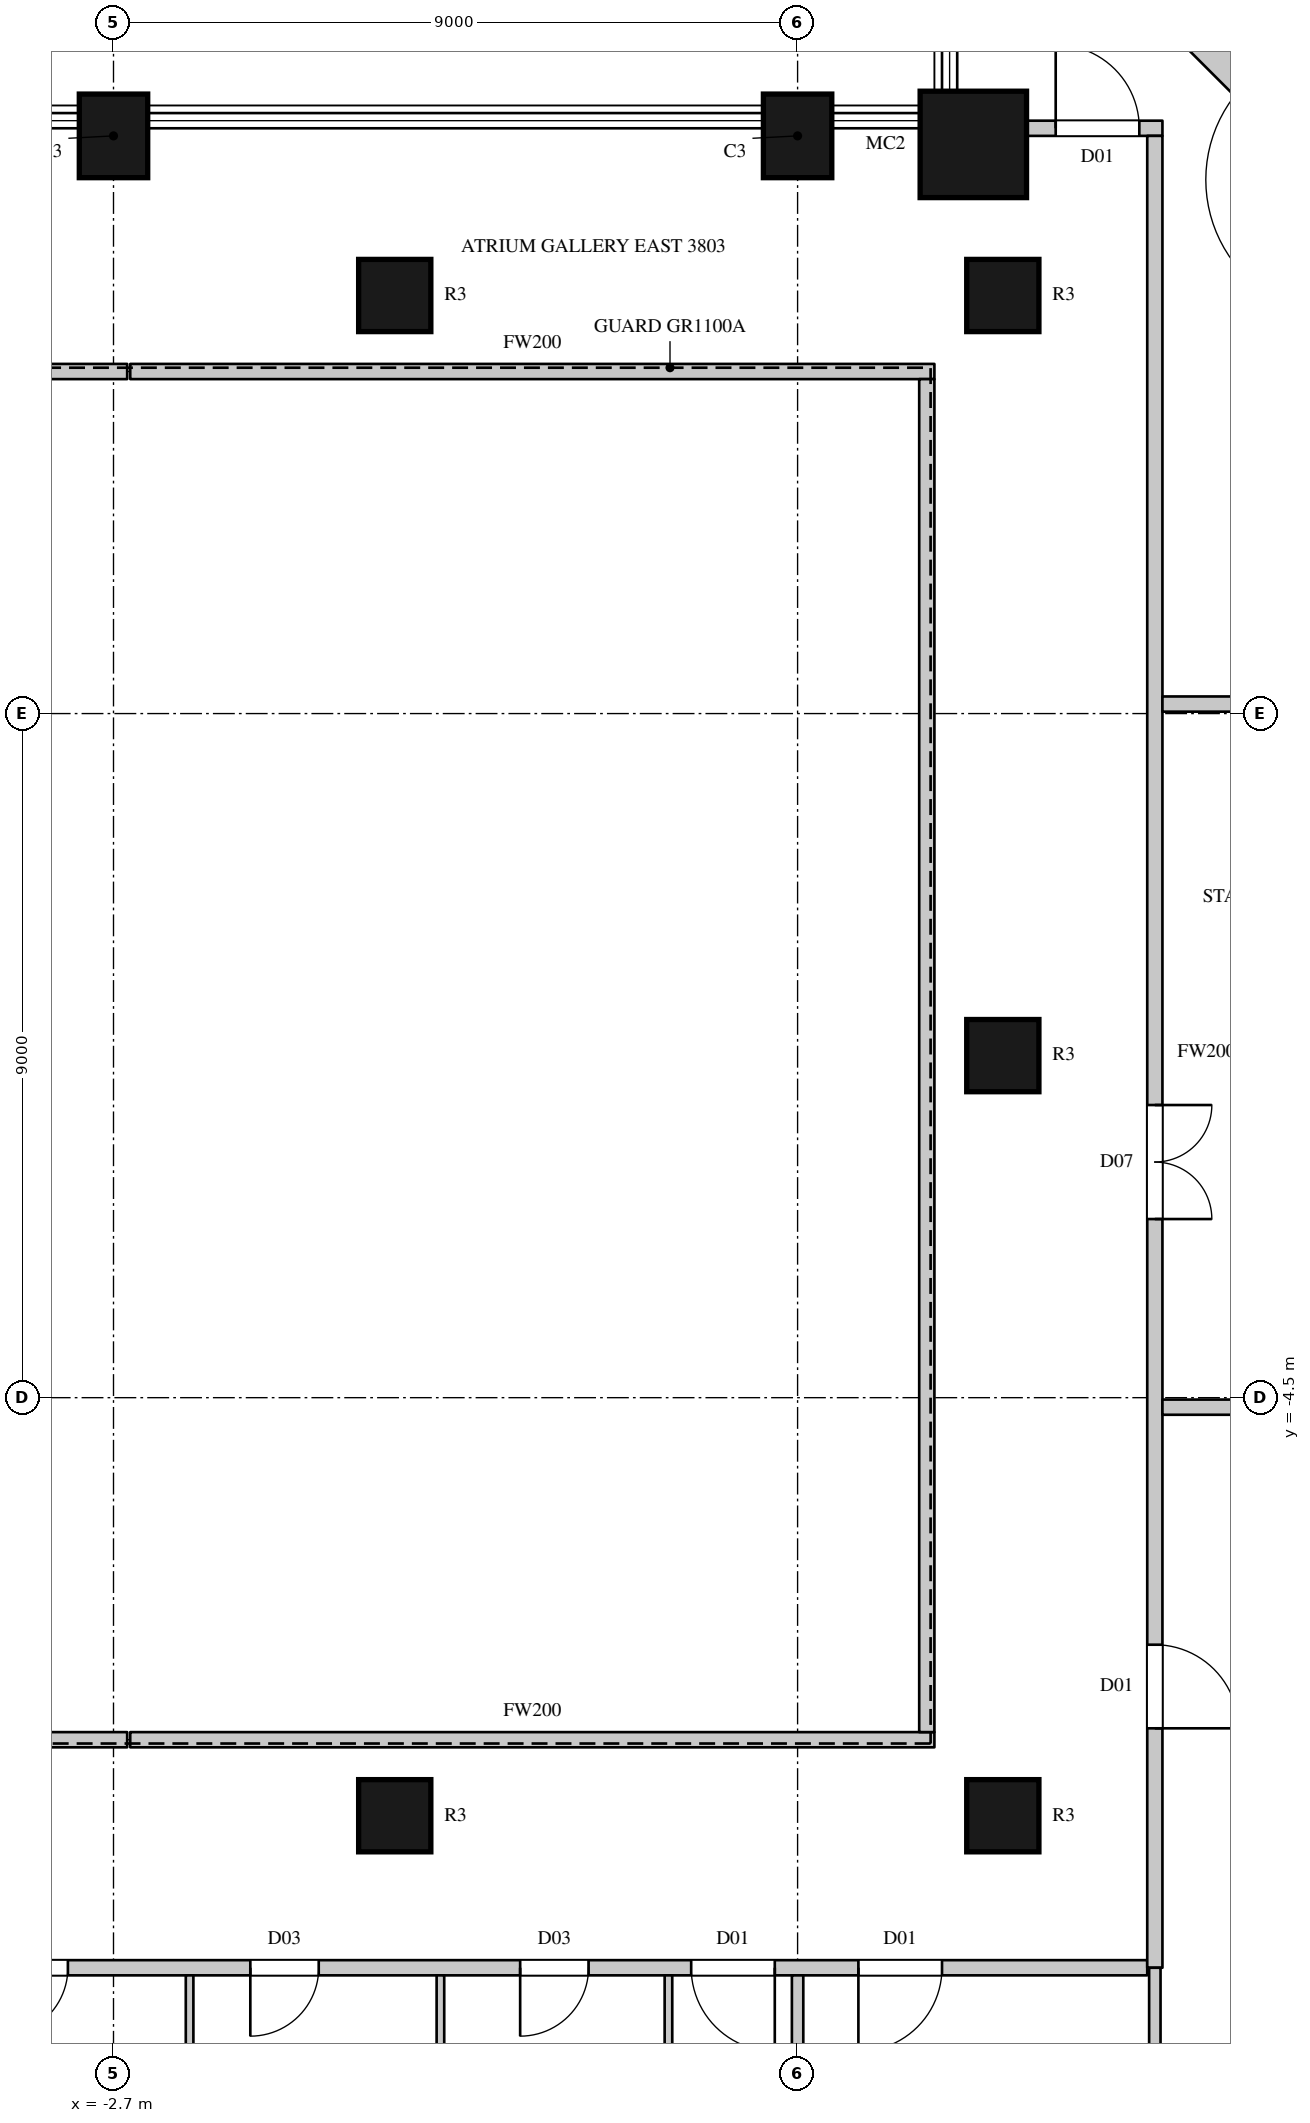
"""IFC4 building model, lengths in metres.
Left out: names, types, materials, properties, quantities, classifications, styles, units other than length and angle.
Written with IfcOpenShell. Run it as: python <this file> out.ifc"""

import sys

from ifc_helpers import new_model, si_unit, direction, frame, frame_2d, origin, origin_2d, place, context, subcontext, project, spatial, rectangle, circle, extrude, element, fill, save


model = new_model("IFC4")
c1 = context("Model", 3, precision=1e-05, world=origin(), true_north=direction((0.0, 1.0)))
c2 = subcontext(c1, "Body", "Model", "MODEL_VIEW")
j1 = project(units=[si_unit("LENGTHUNIT", "METRE"), si_unit("PLANEANGLEUNIT", "RADIAN")], contexts=[c1])
p1 = place(None, origin())
s1 = spatial("IfcSite", under=j1, at=p1, CompositionType="ELEMENT")
p2 = place(p1, origin())
s2 = spatial("IfcBuilding", under=s1, at=p2, CompositionType="ELEMENT")
p3 = place(p2, frame((0.0, 0.0, 176.9)))
s3 = spatial("IfcBuildingStorey", under=s2, at=p3, CompositionType="ELEMENT", Elevation=176.9)
p4 = place(p3, frame((8.612, 11.988, 0.0), z_axis=(0.0, 0.0, 1.0), x_axis=(1.0, 0.0, 0.0)))
e1 = element("IfcColumn", 1, at=p4, inside=s3, PredefinedType="COLUMN", context=c2, shape_type="SweptSolid", body=[
    extrude(circle(Radius=0.7, at=origin_2d()), origin(), (0.0, 0.0, 1.0), 4.1),
])
for number, where, z_axis, x_axis in (
    (2, (6.3, 12.1, 0.0), (0.0, 0.0, 1.0), (-1.0, 0.0, 0.0)),
    (3, (-2.7, 12.1, 0.0), (0.0, 0.0, 1.0), (-1.0, 0.0, 0.0)),
):
    element("IfcColumn", number, at=place(p3, frame(where, z_axis=z_axis, x_axis=x_axis)), inside=s3, PredefinedType="COLUMN", context=c2, shape_type="SweptSolid", body=[
        extrude(rectangle(XDim=0.9, YDim=1.1, at=origin_2d()), origin(), (0.0, 0.0, 1.0), 4.1),
    ])
for number, where, z_axis, x_axis in (
    (4, (1.0, -10.0, 0.0), (0.0, 0.0, 1.0), (1.0, 0.0, 0.0)),
    (5, (1.0, 10.0, 0.0), (0.0, 0.0, 1.0), (1.0, 0.0, 0.0)),
    (6, (9.0, -10.0, 0.0), (0.0, 0.0, 1.0), (1.0, 0.0, 0.0)),
    (7, (9.0, 0.0, 0.0), (0.0, 0.0, 1.0), (1.0, 0.0, 0.0)),
    (8, (9.0, 10.0, 0.0), (0.0, 0.0, 1.0), (1.0, 0.0, 0.0)),
):
    element("IfcColumn", number, at=place(p3, frame(where, z_axis=z_axis, x_axis=x_axis)), inside=s3, PredefinedType="COLUMN", context=c2, shape_type="SweptSolid", body=[
        extrude(circle(Radius=0.475, at=origin_2d()), origin(), (0.0, 0.0, 1.0), 4.1),
    ])
p5 = place(p3, frame((13.941, 11.053, 0.0), z_axis=(0.0, 0.0, 1.0), x_axis=(-0.707106781187, 0.707106781187, 0.0)))
e9 = element("IfcWall", 9, at=p5, inside=s3, PredefinedType="SOLIDWALL", context=c2, shape_type="SweptSolid", body=[
    extrude(rectangle(XDim=6.505, YDim=0.45, at=frame_2d((3.252, 0.0))), origin(), (0.0, 0.0, 1.0), 3.8),
])
p6 = place(p5, frame((0.665, 0.0, 0.0)))
e10 = element("IfcOpeningElement", 10, at=p6, cuts=e9, PredefinedType="OPENING", context=c2, shape_type="SweptSolid", body=[
    extrude(rectangle(XDim=1.8, YDim=2.4, at=frame_2d((0.9, 1.2))), frame((0.0, 0.235, 0.0), z_axis=(0.0, -1.0, 0.0), x_axis=(1.0, 0.0, 0.0)), (0.0, 0.0, 1.0), 0.47),
])
p7 = place(p3, frame((-10.9, -12.0, 0.0), z_axis=(0.0, 0.0, 1.0), x_axis=(1.0, 0.0, 0.0)))
e11 = element("IfcWall", 11, at=p7, inside=s3, PredefinedType="PARTITIONING", context=c2, shape_type="SweptSolid", body=[
    extrude(rectangle(XDim=21.8, YDim=0.2, at=frame_2d((10.9, 0.0))), origin(), (0.0, 0.0, 1.0), 3.8),
])
p8 = place(p7, frame((0.95, 0.0, 0.0)))
e12 = element("IfcOpeningElement", 12, at=p8, cuts=e11, PredefinedType="OPENING", context=c2, shape_type="SweptSolid", body=[
    extrude(rectangle(XDim=0.9, YDim=2.2, at=frame_2d((0.45, 1.1))), frame((0.0, 0.11, 0.0), z_axis=(0.0, -1.0, 0.0), x_axis=(1.0, 0.0, 0.0)), (0.0, 0.0, 1.0), 0.22),
])
p9 = place(p7, frame((3.95, 0.0, 0.0)))
e13 = element("IfcOpeningElement", 13, at=p9, cuts=e11, PredefinedType="OPENING", context=c2, shape_type="SweptSolid", body=[
    extrude(rectangle(XDim=0.9, YDim=2.2, at=frame_2d((0.45, 1.1))), frame((0.0, 0.11, 0.0), z_axis=(0.0, -1.0, 0.0), x_axis=(1.0, 0.0, 0.0)), (0.0, 0.0, 1.0), 0.22),
])
p10 = place(p7, frame((6.7, 0.0, 0.0)))
e14 = element("IfcOpeningElement", 14, at=p10, cuts=e11, PredefinedType="OPENING", context=c2, shape_type="SweptSolid", body=[
    extrude(rectangle(XDim=0.9, YDim=2.2, at=frame_2d((0.45, 1.1))), frame((0.0, 0.11, 0.0), z_axis=(0.0, -1.0, 0.0), x_axis=(1.0, 0.0, 0.0)), (0.0, 0.0, 1.0), 0.22),
])
p11 = place(p7, frame((10.0, 0.0, 0.0)))
e15 = element("IfcOpeningElement", 15, at=p11, cuts=e11, PredefinedType="OPENING", context=c2, shape_type="SweptSolid", body=[
    extrude(rectangle(XDim=0.9, YDim=2.2, at=frame_2d((0.45, 1.1))), frame((0.0, 0.11, 0.0), z_axis=(0.0, -1.0, 0.0), x_axis=(1.0, 0.0, 0.0)), (0.0, 0.0, 1.0), 0.22),
])
p12 = place(p7, frame((13.55, 0.0, 0.0)))
e16 = element("IfcOpeningElement", 16, at=p12, cuts=e11, PredefinedType="OPENING", context=c2, shape_type="SweptSolid", body=[
    extrude(rectangle(XDim=0.9, YDim=2.2, at=frame_2d((0.45, 1.1))), frame((0.0, 0.11, 0.0), z_axis=(0.0, -1.0, 0.0), x_axis=(1.0, 0.0, 0.0)), (0.0, 0.0, 1.0), 0.22),
])
p13 = place(p7, frame((15.8, 0.0, 0.0)))
e17 = element("IfcOpeningElement", 17, at=p13, cuts=e11, PredefinedType="OPENING", context=c2, shape_type="SweptSolid", body=[
    extrude(rectangle(XDim=1.1, YDim=2.4, at=frame_2d((0.55, 1.2))), frame((0.0, 0.11, 0.0), z_axis=(0.0, -1.0, 0.0), x_axis=(1.0, 0.0, 0.0)), (0.0, 0.0, 1.0), 0.22),
])
p14 = place(p7, frame((18.0, 0.0, 0.0)))
e18 = element("IfcOpeningElement", 18, at=p14, cuts=e11, PredefinedType="OPENING", context=c2, shape_type="SweptSolid", body=[
    extrude(rectangle(XDim=1.1, YDim=2.4, at=frame_2d((0.55, 1.2))), frame((0.0, 0.11, 0.0), z_axis=(0.0, -1.0, 0.0), x_axis=(1.0, 0.0, 0.0)), (0.0, 0.0, 1.0), 0.22),
])
for number, where, z_axis, x_axis in (
    (19, (-6.1, -9.0, 0.0), (0.0, 0.0, 1.0), (1.0, 0.0, 0.0)),
    (20, (-6.1, 9.0, 0.0), (0.0, 0.0, 1.0), (1.0, 0.0, 0.0)),
):
    element("IfcWall", number, at=place(p3, frame(where, z_axis=z_axis, x_axis=x_axis)), inside=s3, PredefinedType="PARTITIONING", context=c2, shape_type="SweptSolid", body=[
        extrude(rectangle(XDim=3.58, YDim=0.2, at=frame_2d((1.79, 0.0))), origin(), (0.0, 0.0, 1.0), 3.8),
    ])
for number, where, z_axis, x_axis in (
    (21, (-2.48, -9.0, 0.0), (0.0, 0.0, 1.0), (1.0, 0.0, 0.0)),
    (22, (-2.48, 9.0, 0.0), (0.0, 0.0, 1.0), (1.0, 0.0, 0.0)),
):
    element("IfcWall", number, at=place(p3, frame(where, z_axis=z_axis, x_axis=x_axis)), inside=s3, PredefinedType="PARTITIONING", context=c2, shape_type="SweptSolid", body=[
        extrude(rectangle(XDim=10.58, YDim=0.2, at=frame_2d((5.29, 0.0))), origin(), (0.0, 0.0, 1.0), 3.8),
    ])
p15 = place(p3, frame((8.0, -8.9, 0.0), z_axis=(0.0, 0.0, 1.0), x_axis=(0.0, 1.0, 0.0)))
e23 = element("IfcWall", 23, at=p15, inside=s3, PredefinedType="PARTITIONING", context=c2, shape_type="SweptSolid", body=[
    extrude(rectangle(XDim=17.8, YDim=0.2, at=frame_2d((8.9, 0.0))), origin(), (0.0, 0.0, 1.0), 3.8),
])
p16 = place(p3, frame((9.296, 12.2, 0.0), z_axis=(0.0, 0.0, 1.0), x_axis=(1.0, 0.0, 0.0)))
e24 = element("IfcWall", 24, at=p16, inside=s3, PredefinedType="PARTITIONING", context=c2, shape_type="SweptSolid", body=[
    extrude(rectangle(XDim=1.804, YDim=0.2, at=frame_2d((0.902, 0.0))), origin(), (0.0, 0.0, 1.0), 3.8),
])
p17 = place(p16, frame((0.4, 0.0, 0.0)))
e25 = element("IfcOpeningElement", 25, at=p17, cuts=e24, PredefinedType="OPENING", context=c2, shape_type="SweptSolid", body=[
    extrude(rectangle(XDim=1.1, YDim=2.4, at=frame_2d((0.55, 1.2))), frame((0.0, 0.11, 0.0), z_axis=(0.0, -1.0, 0.0), x_axis=(1.0, 0.0, 0.0)), (0.0, 0.0, 1.0), 0.22),
])
p18 = place(p3, frame((11.0, -12.0, 0.0), z_axis=(0.0, 0.0, 1.0), x_axis=(0.0, 1.0, 0.0)))
e26 = element("IfcWall", 26, at=p18, inside=s3, PredefinedType="PARTITIONING", context=c2, shape_type="SweptSolid", body=[
    extrude(rectangle(XDim=24.1, YDim=0.2, at=frame_2d((12.05, 0.0))), origin(), (0.0, 0.0, 1.0), 3.8),
])
p19 = place(p18, frame((9.85, 0.0, 0.0)))
e27 = element("IfcOpeningElement", 27, at=p19, cuts=e26, PredefinedType="OPENING", context=c2, shape_type="SweptSolid", body=[
    extrude(rectangle(XDim=1.5, YDim=2.4, at=frame_2d((0.75, 1.2))), frame((0.0, 0.11, 0.0), z_axis=(0.0, -1.0, 0.0), x_axis=(1.0, 0.0, 0.0)), (0.0, 0.0, 1.0), 0.22),
])
p20 = place(p18, frame((3.15, 0.0, 0.0)))
e28 = element("IfcOpeningElement", 28, at=p20, cuts=e26, PredefinedType="OPENING", context=c2, shape_type="SweptSolid", body=[
    extrude(rectangle(XDim=1.1, YDim=2.4, at=frame_2d((0.55, 1.2))), frame((0.0, 0.11, 0.0), z_axis=(0.0, -1.0, 0.0), x_axis=(1.0, 0.0, 0.0)), (0.0, 0.0, 1.0), 0.22),
])
for number, where, z_axis, x_axis in (
    (29, (11.1, -4.625, 0.0), (0.0, 0.0, 1.0), (1.0, 0.0, 0.0)),
    (30, (11.1, 4.625, 0.0), (0.0, 0.0, 1.0), (1.0, 0.0, 0.0)),
):
    element("IfcWall", number, at=place(p3, frame(where, z_axis=z_axis, x_axis=x_axis)), inside=s3, PredefinedType="PARTITIONING", context=c2, shape_type="SweptSolid", body=[
        extrude(rectangle(XDim=3.575, YDim=0.2, at=frame_2d((1.788, 0.0))), origin(), (0.0, 0.0, 1.0), 3.8),
    ])
p21 = place(p3, frame((6.3, -16.05, 0.0), z_axis=(0.0, 0.0, 1.0), x_axis=(0.0, 1.0, 0.0)))
e31 = element("IfcWall", 31, at=p21, inside=s3, PredefinedType="PARTITIONING", context=c2, shape_type="SweptSolid", body=[
    extrude(rectangle(XDim=3.95, YDim=0.15, at=frame_2d((1.975, 0.0))), origin(), (0.0, 0.0, 1.0), 3.25),
])
p22 = place(p3, frame((11.0, -16.7, 0.0), z_axis=(0.0, 0.0, 1.0), x_axis=(0.0, 1.0, 0.0)))
e32 = element("IfcWall", 32, at=p22, inside=s3, PredefinedType="PARTITIONING", context=c2, shape_type="SweptSolid", body=[
    extrude(rectangle(XDim=4.7, YDim=0.15, at=frame_2d((2.35, 0.0))), origin(), (0.0, 0.0, 1.0), 3.8),
])
p23 = place(p3, frame((-1.699, -16.7, 0.0), z_axis=(0.0, 0.0, 1.0), x_axis=(0.0, 1.0, 0.0)))
e33 = element("IfcWall", 33, at=p23, inside=s3, PredefinedType="PARTITIONING", context=c2, shape_type="SweptSolid", body=[
    extrude(rectangle(XDim=4.6, YDim=0.1, at=frame_2d((2.3, 0.0))), origin(), (0.0, 0.0, 1.0), 3.8),
])
p24 = place(p3, frame((1.601, -16.7, 0.0), z_axis=(0.0, 0.0, 1.0), x_axis=(0.0, 1.0, 0.0)))
e34 = element("IfcWall", 34, at=p24, inside=s3, PredefinedType="PARTITIONING", context=c2, shape_type="SweptSolid", body=[
    extrude(rectangle(XDim=4.6, YDim=0.1, at=frame_2d((2.3, 0.0))), origin(), (0.0, 0.0, 1.0), 3.15),
])
p25 = place(p3, frame((4.601, -16.7, 0.0), z_axis=(0.0, 0.0, 1.0), x_axis=(0.0, 1.0, 0.0)))
e35 = element("IfcWall", 35, at=p25, inside=s3, PredefinedType="PARTITIONING", context=c2, shape_type="SweptSolid", body=[
    extrude(rectangle(XDim=4.6, YDim=0.1, at=frame_2d((2.3, 0.0))), origin(), (0.0, 0.0, 1.0), 3.8),
])
p26 = place(p19, origin())
e36 = element("IfcDoor", 36, at=p26, inside=s3, OperationType="DOUBLE_DOOR_SINGLE_SWING", PredefinedType="DOOR", context=c2, shape_type="SweptSolid", body=[
    extrude(rectangle(XDim=1.5, YDim=2.4, at=frame_2d((0.75, 1.2))), frame((0.0, 0.025, 0.0), z_axis=(0.0, -1.0, 0.0), x_axis=(1.0, 0.0, 0.0)), (0.0, 0.0, 1.0), 0.05),
])
fill(e27, e36)
p27 = place(p10, origin())
e37 = element("IfcDoor", 37, at=p27, inside=s3, OperationType="SINGLE_SWING_RIGHT", PredefinedType="DOOR", context=c2, shape_type="SweptSolid", body=[
    extrude(rectangle(XDim=0.9, YDim=2.2, at=frame_2d((0.45, 1.1))), frame((0.0, 0.025, 0.0), z_axis=(0.0, -1.0, 0.0), x_axis=(1.0, 0.0, 0.0)), (0.0, 0.0, 1.0), 0.05),
])
fill(e14, e37)
p28 = place(p11, origin())
e38 = element("IfcDoor", 38, at=p28, inside=s3, OperationType="SINGLE_SWING_RIGHT", PredefinedType="DOOR", context=c2, shape_type="SweptSolid", body=[
    extrude(rectangle(XDim=0.9, YDim=2.2, at=frame_2d((0.45, 1.1))), frame((0.0, 0.025, 0.0), z_axis=(0.0, -1.0, 0.0), x_axis=(1.0, 0.0, 0.0)), (0.0, 0.0, 1.0), 0.05),
])
fill(e15, e38)
p29 = place(p12, origin())
e39 = element("IfcDoor", 39, at=p29, inside=s3, OperationType="SINGLE_SWING_RIGHT", PredefinedType="DOOR", context=c2, shape_type="SweptSolid", body=[
    extrude(rectangle(XDim=0.9, YDim=2.2, at=frame_2d((0.45, 1.1))), frame((0.0, 0.025, 0.0), z_axis=(0.0, -1.0, 0.0), x_axis=(1.0, 0.0, 0.0)), (0.0, 0.0, 1.0), 0.05),
])
fill(e16, e39)
p30 = place(p13, origin())
e40 = element("IfcDoor", 40, at=p30, inside=s3, OperationType="SINGLE_SWING_LEFT", PredefinedType="DOOR", context=c2, shape_type="SweptSolid", body=[
    extrude(rectangle(XDim=1.1, YDim=2.4, at=frame_2d((0.55, 1.2))), frame((0.0, 0.025, 0.0), z_axis=(0.0, -1.0, 0.0), x_axis=(1.0, 0.0, 0.0)), (0.0, 0.0, 1.0), 0.05),
])
fill(e17, e40)
p31 = place(p14, origin())
e41 = element("IfcDoor", 41, at=p31, inside=s3, OperationType="SINGLE_SWING_RIGHT", PredefinedType="DOOR", context=c2, shape_type="SweptSolid", body=[
    extrude(rectangle(XDim=1.1, YDim=2.4, at=frame_2d((0.55, 1.2))), frame((0.0, 0.025, 0.0), z_axis=(0.0, -1.0, 0.0), x_axis=(1.0, 0.0, 0.0)), (0.0, 0.0, 1.0), 0.05),
])
fill(e18, e41)
p32 = place(p17, origin())
e42 = element("IfcDoor", 42, at=p32, inside=s3, OperationType="SINGLE_SWING_LEFT", PredefinedType="DOOR", context=c2, shape_type="SweptSolid", body=[
    extrude(rectangle(XDim=1.1, YDim=2.4, at=frame_2d((0.55, 1.2))), frame((0.0, 0.025, 0.0), z_axis=(0.0, -1.0, 0.0), x_axis=(1.0, 0.0, 0.0)), (0.0, 0.0, 1.0), 0.05),
])
fill(e25, e42)
p33 = place(p20, origin())
e43 = element("IfcDoor", 43, at=p33, inside=s3, OperationType="SINGLE_SWING_RIGHT", PredefinedType="DOOR", context=c2, shape_type="SweptSolid", body=[
    extrude(rectangle(XDim=1.1, YDim=2.4, at=frame_2d((0.55, 1.2))), frame((0.0, 0.025, 0.0), z_axis=(0.0, -1.0, 0.0), x_axis=(1.0, 0.0, 0.0)), (0.0, 0.0, 1.0), 0.05),
])
fill(e28, e43)
save(model, sys.argv[1])
